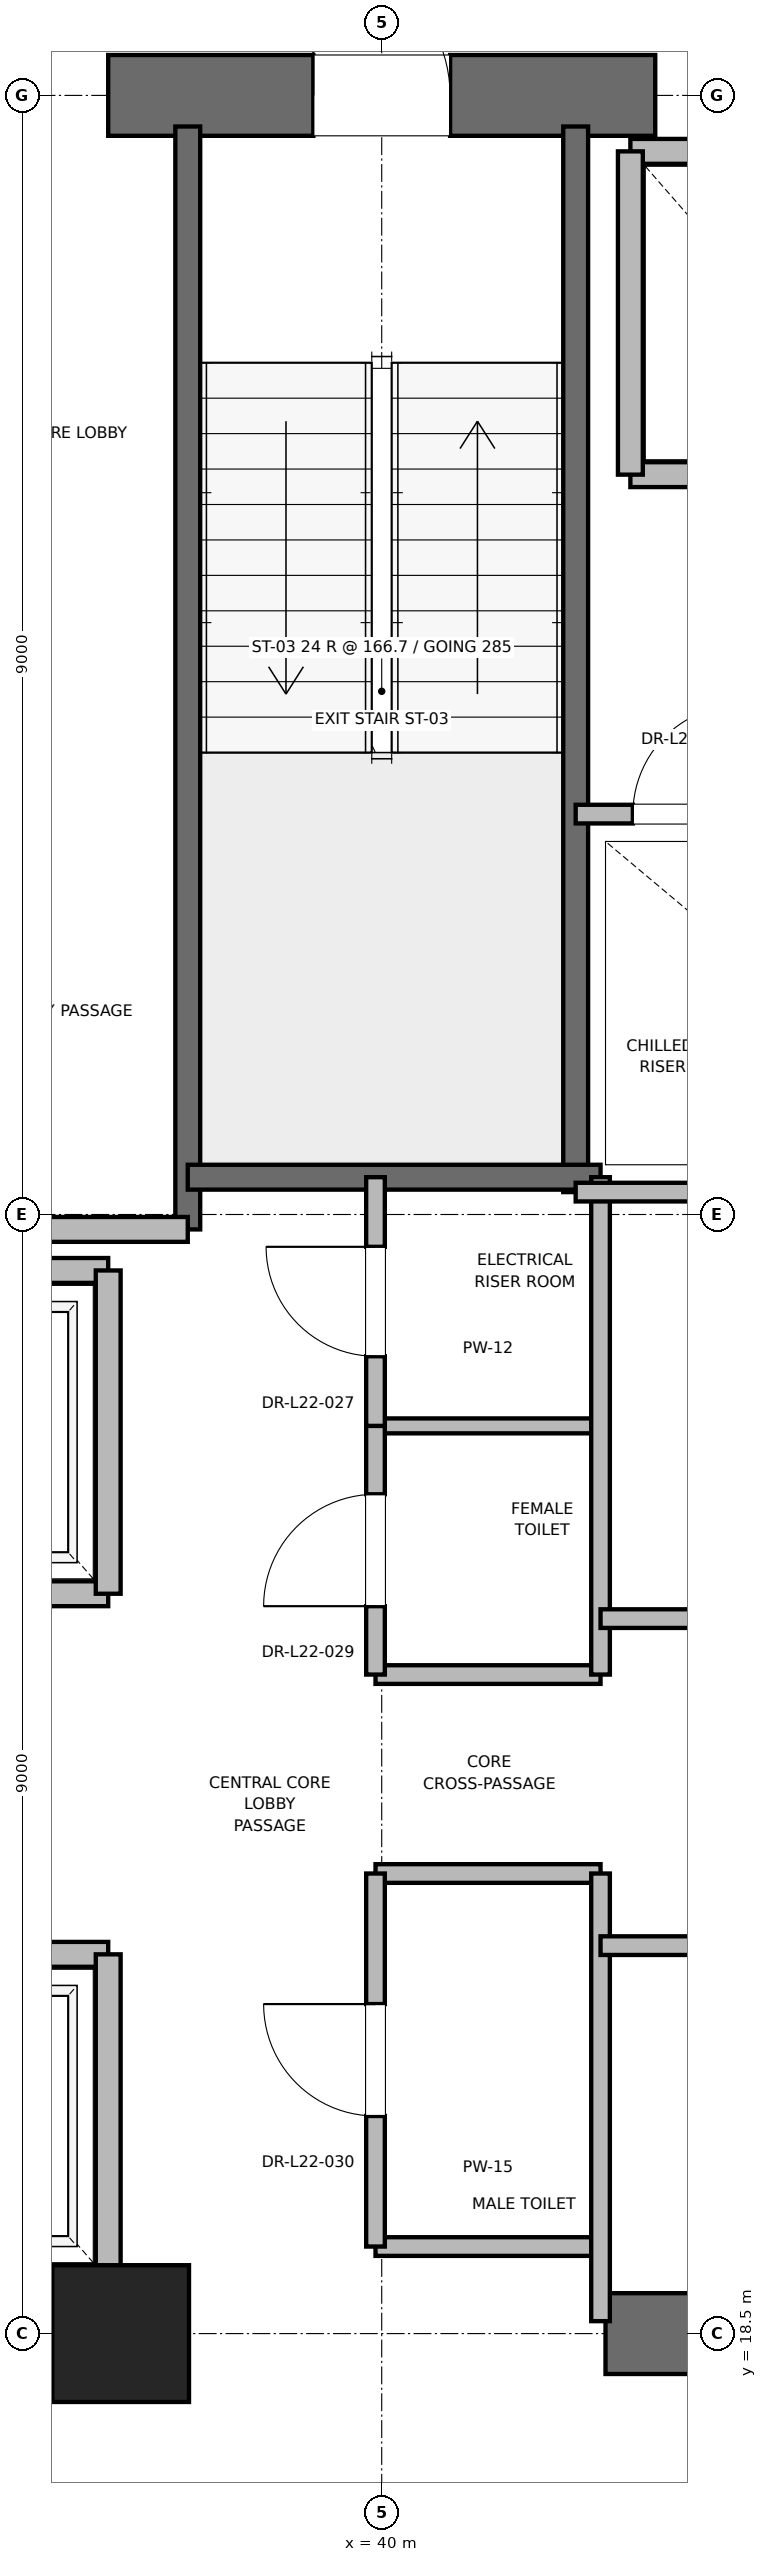
"""IFC4 building model, lengths in metres.
Left out: names, types, materials, properties, quantities, classifications, styles, units other than length and angle.
Written with IfcOpenShell. Run it as: python <this file> out.ifc"""

import sys

from ifc_helpers import new_model, si_unit, direction, frame, frame_2d, origin, origin_2d, place, context, subcontext, project, spatial, rectangle, extrude, element, fill, save


model = new_model("IFC4")
c1 = context("Model", 3, precision=1e-05, world=origin(), true_north=direction((0.0, 1.0)))
c2 = subcontext(c1, "Body", "Model", "MODEL_VIEW")
j1 = project(units=[si_unit("LENGTHUNIT", "METRE"), si_unit("PLANEANGLEUNIT", "RADIAN")], contexts=[c1])
p1 = place(None, origin())
s1 = spatial("IfcSite", under=j1, at=p1, CompositionType="ELEMENT")
p2 = place(p1, origin())
s2 = spatial("IfcBuilding", under=s1, at=p2, CompositionType="ELEMENT")
p3 = place(p2, frame((0.0, 0.0, 95.6)))
s3 = spatial("IfcBuildingStorey", under=s2, at=p3, CompositionType="ELEMENT", Elevation=95.6)
p4 = place(p3, frame((37.9, 18.5, 0.0), z_axis=(0.0, 0.0, 1.0), x_axis=(1.0, 0.0, 0.0)))
e1 = element("IfcColumn", 1, at=p4, inside=s3, PredefinedType="PILASTER", context=c2, shape_type="SweptSolid", body=[
    extrude(rectangle(XDim=1.1, YDim=1.1, at=origin_2d()), origin(), (0.0, 0.0, 1.0), 4.0),
])
for number, where, z_axis, x_axis in (
    (2, (29.0, 18.5, 0.0), (0.0, 0.0, 1.0), (1.0, 0.0, 0.0)),
    (3, (41.8, 18.5, 0.0), (0.0, 0.0, 1.0), (1.0, 0.0, 0.0)),
):
    element("IfcWall", number, at=place(p3, frame(where, z_axis=z_axis, x_axis=x_axis)), inside=s3, PredefinedType="SHEAR", context=c2, shape_type="SweptSolid", body=[
        extrude(rectangle(XDim=9.2, YDim=0.65, at=frame_2d((4.6, 0.0))), origin(), (0.0, 0.0, 1.0), 3.76),
    ])
p5 = place(p3, frame((37.8, 36.5, 0.0), z_axis=(0.0, 0.0, 1.0), x_axis=(1.0, 0.0, 0.0)))
e4 = element("IfcWall", 4, at=p5, inside=s3, PredefinedType="SHEAR", context=c2, shape_type="SweptSolid", body=[
    extrude(rectangle(XDim=4.4, YDim=0.65, at=frame_2d((2.2, 0.0))), origin(), (0.0, 0.0, 1.0), 3.76),
])
p6 = place(p5, frame((1.65, 0.0, 0.0)))
e5 = element("IfcOpeningElement", 5, at=p6, cuts=e4, PredefinedType="OPENING", context=c2, shape_type="SweptSolid", body=[
    extrude(rectangle(XDim=1.1, YDim=2.15, at=frame_2d((0.55, 1.075))), frame((0.0, 0.325, 0.0), z_axis=(0.0, -1.0, 0.0), x_axis=(1.0, 0.0, 0.0)), (0.0, 0.0, 1.0), 0.65),
])
p7 = place(p3, frame((38.44, 27.38, 0.0), z_axis=(0.0, 0.0, 1.0), x_axis=(0.0, 1.0, 0.0)))
e6 = element("IfcWall", 6, at=p7, inside=s3, PredefinedType="SOLIDWALL", context=c2, shape_type="SweptSolid", body=[
    extrude(rectangle(XDim=8.87, YDim=0.2, at=frame_2d((4.435, 0.0))), origin(), (0.0, 0.0, 1.0), 3.76),
])
p8 = place(p3, frame((41.56, 27.68, 0.0), z_axis=(0.0, 0.0, 1.0), x_axis=(0.0, 1.0, 0.0)))
e7 = element("IfcWall", 7, at=p8, inside=s3, PredefinedType="SOLIDWALL", context=c2, shape_type="SweptSolid", body=[
    extrude(rectangle(XDim=8.57, YDim=0.2, at=frame_2d((4.285, 0.0))), origin(), (0.0, 0.0, 1.0), 3.76),
])
p9 = place(p3, frame((38.44, 27.8, 0.0), z_axis=(0.0, 0.0, 1.0), x_axis=(1.0, 0.0, 0.0)))
e8 = element("IfcWall", 8, at=p9, inside=s3, PredefinedType="SOLIDWALL", context=c2, shape_type="SweptSolid", body=[
    extrude(rectangle(XDim=3.32, YDim=0.2, at=frame_2d((1.66, 0.0))), origin(), (0.0, 0.0, 1.0), 3.76),
])
p10 = place(p3, frame((32.82, 27.38, 0.0), z_axis=(0.0, 0.0, 1.0), x_axis=(1.0, 0.0, 0.0)))
e9 = element("IfcWall", 9, at=p10, inside=s3, PredefinedType="PARTITIONING", context=c2, shape_type="SweptSolid", body=[
    extrude(rectangle(XDim=5.62, YDim=0.2, at=frame_2d((2.81, 0.0))), origin(), (0.0, 0.0, 1.0), 3.76),
])
p11 = place(p3, frame((35.5, 18.95, 0.0), z_axis=(0.0, 0.0, 1.0), x_axis=(1.0, 0.0, 0.0)))
e10 = element("IfcWall", 10, at=p11, inside=s3, PredefinedType="SOLIDWALL", context=c2, shape_type="SweptSolid", body=[
    extrude(rectangle(XDim=2.3, YDim=0.2, at=frame_2d((1.15, 0.0))), origin(), (0.0, 0.0, 1.0), 2.54),
])
p12 = place(p3, frame((37.8, 21.55, 0.0), z_axis=(0.0, 0.0, 1.0), x_axis=(-1.0, 0.0, 0.0)))
e11 = element("IfcWall", 11, at=p12, inside=s3, PredefinedType="SOLIDWALL", context=c2, shape_type="SweptSolid", body=[
    extrude(rectangle(XDim=2.3, YDim=0.2, at=frame_2d((1.15, 0.0))), origin(), (0.0, 0.0, 1.0), 3.76),
])
p13 = place(p12, frame((0.6, 0.0, 0.0)))
e12 = element("IfcOpeningElement", 12, at=p13, cuts=e11, PredefinedType="OPENING", context=c2, shape_type="SweptSolid", body=[
    extrude(rectangle(XDim=1.1, YDim=2.2, at=frame_2d((0.55, 1.1))), frame((0.0, 0.1, 0.0), z_axis=(0.0, -1.0, 0.0), x_axis=(1.0, 0.0, 0.0)), (0.0, 0.0, 1.0), 0.2),
])
p14 = place(p3, frame((37.8, 18.95, 0.0), z_axis=(0.0, 0.0, 1.0), x_axis=(0.0, 1.0, 0.0)))
e13 = element("IfcWall", 13, at=p14, inside=s3, PredefinedType="SOLIDWALL", context=c2, shape_type="SweptSolid", body=[
    extrude(rectangle(XDim=2.6, YDim=0.2, at=frame_2d((1.3, 0.0))), origin(), (0.0, 0.0, 1.0), 2.54),
])
p15 = place(p3, frame((35.5, 24.45, 0.0), z_axis=(0.0, 0.0, 1.0), x_axis=(1.0, 0.0, 0.0)))
e14 = element("IfcWall", 14, at=p15, inside=s3, PredefinedType="SOLIDWALL", context=c2, shape_type="SweptSolid", body=[
    extrude(rectangle(XDim=2.3, YDim=0.2, at=frame_2d((1.15, 0.0))), origin(), (0.0, 0.0, 1.0), 3.76),
])
p16 = place(p15, frame((0.6, 0.0, 0.0)))
e15 = element("IfcOpeningElement", 15, at=p16, cuts=e14, PredefinedType="OPENING", context=c2, shape_type="SweptSolid", body=[
    extrude(rectangle(XDim=1.1, YDim=2.2, at=frame_2d((0.55, 1.1))), frame((0.0, 0.1, 0.0), z_axis=(0.0, -1.0, 0.0), x_axis=(1.0, 0.0, 0.0)), (0.0, 0.0, 1.0), 0.2),
])
p17 = place(p3, frame((37.8, 27.05, 0.0), z_axis=(0.0, 0.0, 1.0), x_axis=(-1.0, 0.0, 0.0)))
e16 = element("IfcWall", 16, at=p17, inside=s3, PredefinedType="SOLIDWALL", context=c2, shape_type="SweptSolid", body=[
    extrude(rectangle(XDim=2.3, YDim=0.2, at=frame_2d((1.15, 0.0))), origin(), (0.0, 0.0, 1.0), 3.76),
])
p18 = place(p3, frame((37.8, 24.45, 0.0), z_axis=(0.0, 0.0, 1.0), x_axis=(0.0, 1.0, 0.0)))
e17 = element("IfcWall", 17, at=p18, inside=s3, PredefinedType="SOLIDWALL", context=c2, shape_type="SweptSolid", body=[
    extrude(rectangle(XDim=2.6, YDim=0.2, at=frame_2d((1.3, 0.0))), origin(), (0.0, 0.0, 1.0), 3.76),
])
p19 = place(p3, frame((42.0, 33.45, 0.0), z_axis=(0.0, 0.0, 1.0), x_axis=(1.0, 0.0, 0.0)))
e18 = element("IfcWall", 18, at=p19, inside=s3, PredefinedType="SOLIDWALL", context=c2, shape_type="SweptSolid", body=[
    extrude(rectangle(XDim=2.3, YDim=0.2, at=frame_2d((1.15, 0.0))), origin(), (0.0, 0.0, 1.0), 3.76),
])
p20 = place(p3, frame((44.3, 36.05, 0.0), z_axis=(0.0, 0.0, 1.0), x_axis=(-1.0, 0.0, 0.0)))
e19 = element("IfcWall", 19, at=p20, inside=s3, PredefinedType="SOLIDWALL", context=c2, shape_type="SweptSolid", body=[
    extrude(rectangle(XDim=2.3, YDim=0.2, at=frame_2d((1.15, 0.0))), origin(), (0.0, 0.0, 1.0), 2.54),
])
p21 = place(p3, frame((42.0, 36.05, 0.0), z_axis=(0.0, 0.0, 1.0), x_axis=(0.0, -1.0, 0.0)))
e20 = element("IfcWall", 20, at=p21, inside=s3, PredefinedType="SOLIDWALL", context=c2, shape_type="SweptSolid", body=[
    extrude(rectangle(XDim=2.6, YDim=0.2, at=frame_2d((1.3, 0.0))), origin(), (0.0, 0.0, 1.0), 2.54),
])
for number, where, z_axis, x_axis in (
    (21, (39.95, 19.2, 0.0), (0.0, 0.0, 1.0), (1.0, 0.0, 0.0)),
    (22, (39.95, 22.2, 0.0), (0.0, 0.0, 1.0), (1.0, 0.0, 0.0)),
    (23, (39.95, 23.8, 0.0), (0.0, 0.0, 1.0), (1.0, 0.0, 0.0)),
):
    element("IfcWall", number, at=place(p3, frame(where, z_axis=z_axis, x_axis=x_axis)), inside=s3, PredefinedType="PARTITIONING", context=c2, shape_type="SweptSolid", body=[
        extrude(rectangle(XDim=1.81, YDim=0.15, at=frame_2d((0.905, 0.0))), origin(), (0.0, 0.0, 1.0), 2.85),
    ])
p22 = place(p3, frame((39.95, 25.8, 0.0), z_axis=(0.0, 0.0, 1.0), x_axis=(1.0, 0.0, 0.0)))
e24 = element("IfcWall", 24, at=p22, inside=s3, PredefinedType="PARTITIONING", context=c2, shape_type="SweptSolid", body=[
    extrude(rectangle(XDim=1.81, YDim=0.12, at=frame_2d((0.905, 0.0))), origin(), (0.0, 0.0, 1.0), 2.85),
])
p23 = place(p3, frame((41.76, 18.6, 0.0), z_axis=(0.0, 0.0, 1.0), x_axis=(0.0, 1.0, 0.0)))
e25 = element("IfcWall", 25, at=p23, inside=s3, PredefinedType="PARTITIONING", context=c2, shape_type="SweptSolid", body=[
    extrude(rectangle(XDim=3.6, YDim=0.15, at=frame_2d((1.8, 0.0))), origin(), (0.0, 0.0, 1.0), 2.54),
])
p24 = place(p3, frame((41.76, 23.8, 0.0), z_axis=(0.0, 0.0, 1.0), x_axis=(0.0, 1.0, 0.0)))
e26 = element("IfcWall", 26, at=p24, inside=s3, PredefinedType="PARTITIONING", context=c2, shape_type="SweptSolid", body=[
    extrude(rectangle(XDim=4.0, YDim=0.15, at=frame_2d((2.0, 0.0))), origin(), (0.0, 0.0, 1.0), 2.85),
])
p25 = place(p3, frame((39.95, 19.2, 0.0), z_axis=(0.0, 0.0, 1.0), x_axis=(0.0, 1.0, 0.0)))
e27 = element("IfcWall", 27, at=p25, inside=s3, PredefinedType="PARTITIONING", context=c2, shape_type="SweptSolid", body=[
    extrude(rectangle(XDim=3.0, YDim=0.15, at=frame_2d((1.5, 0.0))), origin(), (0.0, 0.0, 1.0), 2.85),
])
p26 = place(p25, frame((1.05, 0.0, 0.0)))
e28 = element("IfcOpeningElement", 28, at=p26, cuts=e27, PredefinedType="OPENING", context=c2, shape_type="SweptSolid", body=[
    extrude(rectangle(XDim=0.9, YDim=2.1, at=frame_2d((0.45, 1.05))), frame((0.0, 0.075, 0.0), z_axis=(0.0, -1.0, 0.0), x_axis=(1.0, 0.0, 0.0)), (0.0, 0.0, 1.0), 0.15),
])
p27 = place(p3, frame((39.95, 23.8, 0.0), z_axis=(0.0, 0.0, 1.0), x_axis=(0.0, 1.0, 0.0)))
e29 = element("IfcWall", 29, at=p27, inside=s3, PredefinedType="PARTITIONING", context=c2, shape_type="SweptSolid", body=[
    extrude(rectangle(XDim=2.0, YDim=0.15, at=frame_2d((1.0, 0.0))), origin(), (0.0, 0.0, 1.0), 2.85),
])
p28 = place(p27, frame((0.55, 0.0, 0.0)))
e30 = element("IfcOpeningElement", 30, at=p28, cuts=e29, PredefinedType="OPENING", context=c2, shape_type="SweptSolid", body=[
    extrude(rectangle(XDim=0.9, YDim=2.1, at=frame_2d((0.45, 1.05))), frame((0.0, 0.075, 0.0), z_axis=(0.0, -1.0, 0.0), x_axis=(1.0, 0.0, 0.0)), (0.0, 0.0, 1.0), 0.15),
])
p29 = place(p3, frame((39.95, 25.8, 0.0), z_axis=(0.0, 0.0, 1.0), x_axis=(0.0, 1.0, 0.0)))
e31 = element("IfcWall", 31, at=p29, inside=s3, PredefinedType="PARTITIONING", context=c2, shape_type="SweptSolid", body=[
    extrude(rectangle(XDim=2.0, YDim=0.15, at=frame_2d((1.0, 0.0))), origin(), (0.0, 0.0, 1.0), 2.85),
])
p30 = place(p29, frame((0.56, 0.0, 0.0)))
e32 = element("IfcOpeningElement", 32, at=p30, cuts=e31, PredefinedType="OPENING", context=c2, shape_type="SweptSolid", body=[
    extrude(rectangle(XDim=0.88, YDim=2.1, at=frame_2d((0.44, 1.05))), frame((0.0, 0.075, 0.0), z_axis=(0.0, -1.0, 0.0), x_axis=(1.0, 0.0, 0.0)), (0.0, 0.0, 1.0), 0.15),
])
p31 = place(p3, frame((41.56, 27.68, 0.0), z_axis=(0.0, 0.0, 1.0), x_axis=(1.0, 0.0, 0.0)))
e33 = element("IfcWall", 33, at=p31, inside=s3, PredefinedType="PARTITIONING", context=c2, shape_type="SweptSolid", body=[
    extrude(rectangle(XDim=3.59, YDim=0.15, at=frame_2d((1.795, 0.0))), origin(), (0.0, 0.0, 1.0), 2.85),
])
p32 = place(p3, frame((41.76, 21.62, 0.0), z_axis=(0.0, 0.0, 1.0), x_axis=(1.0, 0.0, 0.0)))
e34 = element("IfcWall", 34, at=p32, inside=s3, PredefinedType="PARTITIONING", context=c2, shape_type="SweptSolid", body=[
    extrude(rectangle(XDim=3.04, YDim=0.15, at=frame_2d((1.52, 0.0))), origin(), (0.0, 0.0, 1.0), 2.85),
])
p33 = place(p32, frame((1.02, 0.0, 0.0)))
e35 = element("IfcOpeningElement", 35, at=p33, cuts=e34, PredefinedType="OPENING", context=c2, shape_type="SweptSolid", body=[
    extrude(rectangle(XDim=1.0, YDim=2.15, at=frame_2d((0.5, 1.075))), frame((0.0, 0.075, 0.0), z_axis=(0.0, -1.0, 0.0), x_axis=(1.0, 0.0, 0.0)), (0.0, 0.0, 1.0), 0.15),
])
p34 = place(p3, frame((41.76, 24.25, 0.0), z_axis=(0.0, 0.0, 1.0), x_axis=(1.0, 0.0, 0.0)))
e36 = element("IfcWall", 36, at=p34, inside=s3, PredefinedType="PARTITIONING", context=c2, shape_type="SweptSolid", body=[
    extrude(rectangle(XDim=3.39, YDim=0.15, at=frame_2d((1.695, 0.0))), origin(), (0.0, 0.0, 1.0), 2.85),
])
p35 = place(p34, frame((1.255, 0.0, 0.0)))
e37 = element("IfcOpeningElement", 37, at=p35, cuts=e36, PredefinedType="OPENING", context=c2, shape_type="SweptSolid", body=[
    extrude(rectangle(XDim=0.88, YDim=2.1, at=frame_2d((0.44, 1.05))), frame((0.0, 0.075, 0.0), z_axis=(0.0, -1.0, 0.0), x_axis=(1.0, 0.0, 0.0)), (0.0, 0.0, 1.0), 0.15),
])
p36 = place(p3, frame((41.56, 30.72, 0.0), z_axis=(0.0, 0.0, 1.0), x_axis=(1.0, 0.0, 0.0)))
e38 = element("IfcWall", 38, at=p36, inside=s3, PredefinedType="PARTITIONING", context=c2, shape_type="SweptSolid", body=[
    extrude(rectangle(XDim=1.8, YDim=0.15, at=frame_2d((0.9, 0.0))), origin(), (0.0, 0.0, 1.0), 2.85),
])
p37 = place(p36, frame((0.46, 0.0, 0.0)))
e39 = element("IfcOpeningElement", 39, at=p37, cuts=e38, PredefinedType="OPENING", context=c2, shape_type="SweptSolid", body=[
    extrude(rectangle(XDim=0.88, YDim=2.1, at=frame_2d((0.44, 1.05))), frame((0.0, 0.075, 0.0), z_axis=(0.0, -1.0, 0.0), x_axis=(1.0, 0.0, 0.0)), (0.0, 0.0, 1.0), 0.15),
])
p38 = place(p6, origin())
e40 = element("IfcDoor", 40, at=p38, inside=s3, OperationType="SINGLE_SWING_LEFT", PredefinedType="DOOR", context=c2, shape_type="SweptSolid", body=[
    extrude(rectangle(XDim=1.1, YDim=2.15, at=frame_2d((0.55, 1.075))), frame((0.0, 0.025, 0.0), z_axis=(0.0, -1.0, 0.0), x_axis=(1.0, 0.0, 0.0)), (0.0, 0.0, 1.0), 0.05),
])
fill(e5, e40)
p39 = place(p26, origin())
e41 = element("IfcDoor", 41, at=p39, inside=s3, OperationType="SINGLE_SWING_RIGHT", PredefinedType="DOOR", context=c2, shape_type="SweptSolid", body=[
    extrude(rectangle(XDim=0.9, YDim=2.1, at=frame_2d((0.45, 1.05))), frame((0.0, 0.025, 0.0), z_axis=(0.0, -1.0, 0.0), x_axis=(1.0, 0.0, 0.0)), (0.0, 0.0, 1.0), 0.05),
])
fill(e28, e41)
p40 = place(p28, origin())
e42 = element("IfcDoor", 42, at=p40, inside=s3, OperationType="SINGLE_SWING_LEFT", PredefinedType="DOOR", context=c2, shape_type="SweptSolid", body=[
    extrude(rectangle(XDim=0.9, YDim=2.1, at=frame_2d((0.45, 1.05))), frame((0.0, 0.025, 0.0), z_axis=(0.0, -1.0, 0.0), x_axis=(1.0, 0.0, 0.0)), (0.0, 0.0, 1.0), 0.05),
])
fill(e30, e42)
p41 = place(p30, origin())
e43 = element("IfcDoor", 43, at=p41, inside=s3, OperationType="SINGLE_SWING_RIGHT", PredefinedType="DOOR", context=c2, shape_type="SweptSolid", body=[
    extrude(rectangle(XDim=0.88, YDim=2.1, at=frame_2d((0.44, 1.05))), frame((0.0, 0.025, 0.0), z_axis=(0.0, -1.0, 0.0), x_axis=(1.0, 0.0, 0.0)), (0.0, 0.0, 1.0), 0.05),
])
fill(e32, e43)
p42 = place(p37, origin())
e44 = element("IfcDoor", 44, at=p42, inside=s3, OperationType="SINGLE_SWING_RIGHT", PredefinedType="DOOR", context=c2, shape_type="SweptSolid", body=[
    extrude(rectangle(XDim=0.88, YDim=2.1, at=frame_2d((0.44, 1.05))), frame((0.0, 0.025, 0.0), z_axis=(0.0, -1.0, 0.0), x_axis=(1.0, 0.0, 0.0)), (0.0, 0.0, 1.0), 0.05),
])
fill(e39, e44)
save(model, sys.argv[1])
